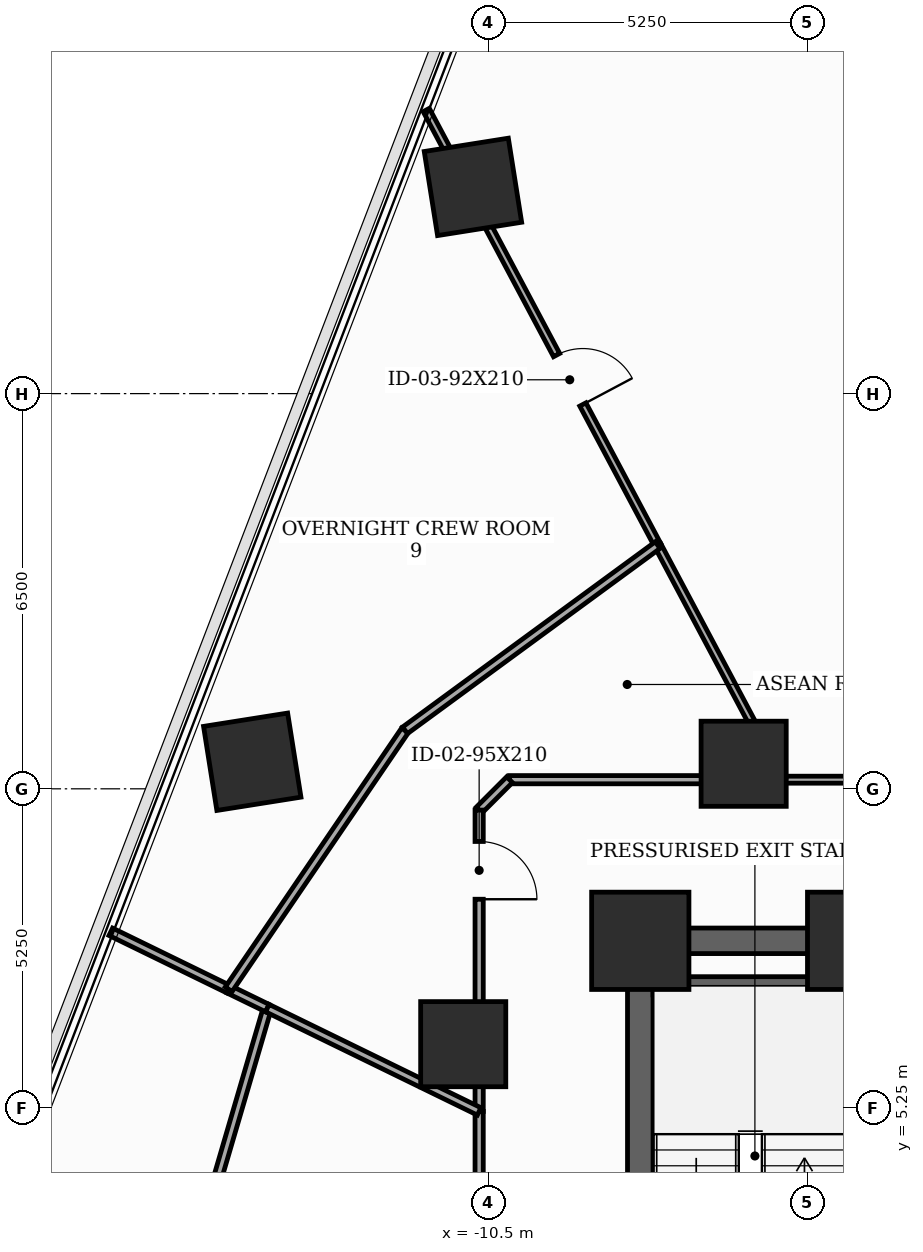
"""IFC4 building model, lengths in metres.
Left out: names, types, materials, properties, quantities, classifications, styles, units other than length and angle.
Written with IfcOpenShell. Run it as: python <this file> out.ifc"""

import sys

from ifc_helpers import new_model, si_unit, direction, frame, frame_2d, origin, origin_2d, place, context, subcontext, project, spatial, rectangle, extrude, element, fill, save


model = new_model("IFC4")
c1 = context("Model", 3, precision=1e-05, world=origin(), true_north=direction((0.0, 1.0)))
c2 = subcontext(c1, "Body", "Model", "MODEL_VIEW")
j1 = project(units=[si_unit("LENGTHUNIT", "METRE"), si_unit("PLANEANGLEUNIT", "RADIAN")], contexts=[c1])
p1 = place(None, origin())
s1 = spatial("IfcSite", under=j1, at=p1, CompositionType="ELEMENT")
p2 = place(p1, origin())
s2 = spatial("IfcBuilding", under=s1, at=p2, CompositionType="ELEMENT")
p3 = place(p2, frame((0.0, 0.0, 77.8)))
s3 = spatial("IfcBuildingStorey", under=s2, at=p3, CompositionType="ELEMENT", Elevation=77.8)
for number, where, z_axis, x_axis in (
    (1, (-4.45, 8.0, 0.0), (0.0, 0.0, 1.0), (1.0, 0.0, 0.0)),
    (2, (-8.0, 8.0, 0.0), (0.0, 0.0, 1.0), (1.0, 0.0, 0.0)),
):
    element("IfcColumn", number, at=place(p3, frame(where, z_axis=z_axis, x_axis=x_axis)), inside=s3, PredefinedType="COLUMN", context=c2, shape_type="SweptSolid", body=[
        extrude(rectangle(XDim=1.6, YDim=1.6, at=origin_2d()), origin(), (0.0, 0.0, 1.0), 3.7),
    ])
for number, where, z_axis, x_axis in (
    (3, (-6.3, 10.912, 0.0), (0.0, 0.0, 1.0), (1.0, 0.0, 0.0)),
    (4, (-10.912, 6.3, 0.0), (0.0, 0.0, 1.0), (1.0, 0.0, 0.0)),
    (5, (-10.752, 20.4, 0.0), (0.0, 0.0, 1.0), (0.988, 0.156, 0.0)),
    (6, (-14.381, 10.945, 0.0), (0.0, 0.0, 1.0), (0.988, 0.156, 0.0)),
):
    element("IfcColumn", number, at=place(p3, frame(where, z_axis=z_axis, x_axis=x_axis)), inside=s3, PredefinedType="COLUMN", context=c2, shape_type="SweptSolid", body=[
        extrude(rectangle(XDim=1.4, YDim=1.4, at=origin_2d()), origin(), (0.0, 0.0, 1.0), 3.7),
    ])
p4 = place(p3, frame((-8.0, -8.0, 0.0), z_axis=(0.0, 0.0, 1.0), x_axis=(0.0, 1.0, 0.0)))
e7 = element("IfcWall", 7, at=p4, inside=s3, PredefinedType="SHEAR", context=c2, shape_type="SweptSolid", body=[
    extrude(rectangle(XDim=16.0, YDim=0.42, at=frame_2d((8.0, 0.0))), origin(), (0.0, 0.0, 1.0), 3.5),
])
p5 = place(p4, frame((1.002, 0.0, 0.0)))
e8 = element("IfcOpeningElement", 8, at=p5, cuts=e7, PredefinedType="OPENING", context=c2, shape_type="SweptSolid", body=[
    extrude(rectangle(XDim=0.85, YDim=2.02, at=frame_2d((0.425, 1.01))), frame((0.0, 0.22, 0.0), z_axis=(0.0, -1.0, 0.0), x_axis=(1.0, 0.0, 0.0)), (0.0, 0.0, 1.0), 0.44),
])
p6 = place(p4, frame((5.35, 0.0, 0.0)))
e9 = element("IfcOpeningElement", 9, at=p6, cuts=e7, PredefinedType="OPENING", context=c2, shape_type="SweptSolid", body=[
    extrude(rectangle(XDim=1.05, YDim=2.15, at=frame_2d((0.525, 1.075))), frame((0.0, 0.22, 0.0), z_axis=(0.0, -1.0, 0.0), x_axis=(1.0, 0.0, 0.0)), (0.0, 0.0, 1.0), 0.44),
])
p7 = place(p3, frame((-8.0, 8.0, 0.0), z_axis=(0.0, 0.0, 1.0), x_axis=(1.0, 0.0, 0.0)))
e10 = element("IfcWall", 10, at=p7, inside=s3, PredefinedType="SHEAR", context=c2, shape_type="SweptSolid", body=[
    extrude(rectangle(XDim=16.0, YDim=0.42, at=frame_2d((8.0, 0.0))), origin(), (0.0, 0.0, 1.0), 3.5),
])
p8 = place(p7, frame((7.1, 0.0, 0.0)))
e11 = element("IfcOpeningElement", 11, at=p8, cuts=e10, PredefinedType="OPENING", context=c2, shape_type="SweptSolid", body=[
    extrude(rectangle(XDim=1.8, YDim=2.15, at=frame_2d((0.9, 1.075))), frame((0.0, 0.22, 0.0), z_axis=(0.0, -1.0, 0.0), x_axis=(1.0, 0.0, 0.0)), (0.0, 0.0, 1.0), 0.44),
])
p9 = place(p3, frame((-7.79, 7.26, 0.0), z_axis=(0.0, 0.0, 1.0), x_axis=(1.0, 0.0, 0.0)))
e12 = element("IfcWall", 12, at=p9, inside=s3, PredefinedType="SHEAR", context=c2, shape_type="SweptSolid", body=[
    extrude(rectangle(XDim=3.34, YDim=0.3, at=frame_2d((1.67, 0.0))), origin(), (0.0, 0.0, 1.0), 3.5),
])
p10 = place(p3, frame((1.715, 10.65, 0.0), z_axis=(0.0, 0.0, 1.0), x_axis=(-1.0, 0.0, 0.0)))
e13 = element("IfcWall", 13, at=p10, inside=s3, PredefinedType="PARTITIONING", context=c2, shape_type="SweptSolid", body=[
    extrude(rectangle(XDim=7.378, YDim=0.115, at=frame_2d((3.689, 0.0))), origin(), (0.0, 0.0, 1.0), 2.785),
])
p11 = place(p3, frame((-10.65, 5.194, 0.0), z_axis=(0.0, 0.0, 1.0), x_axis=(0.0, -1.0, 0.0)))
e14 = element("IfcWall", 14, at=p11, inside=s3, PredefinedType="PARTITIONING", context=c2, shape_type="SweptSolid", body=[
    extrude(rectangle(XDim=6.909, YDim=0.135, at=frame_2d((3.455, 0.0))), origin(), (0.0, 0.0, 1.0), 2.785),
])
p12 = place(p11, frame((2.979, 0.0, 0.0)))
e15 = element("IfcOpeningElement", 15, at=p12, cuts=e14, PredefinedType="OPENING", context=c2, shape_type="SweptSolid", body=[
    extrude(rectangle(XDim=0.95, YDim=2.1, at=frame_2d((0.475, 1.05))), frame((0.0, 0.077, 0.0), z_axis=(0.0, -1.0, 0.0), x_axis=(1.0, 0.0, 0.0)), (0.0, 0.0, 1.0), 0.155),
])
p13 = place(p3, frame((-5.663, 10.65, 0.0), z_axis=(0.0, 0.0, 1.0), x_axis=(-1.0, 0.0, 0.0)))
e16 = element("IfcWall", 16, at=p13, inside=s3, PredefinedType="PARTITIONING", context=c2, shape_type="SweptSolid", body=[
    extrude(rectangle(XDim=4.487, YDim=0.135, at=frame_2d((2.243, 0.0))), origin(), (0.0, 0.0, 1.0), 2.785),
])
p14 = place(p3, frame((-10.15, 10.65, 0.0), z_axis=(0.0, 0.0, 1.0), x_axis=(-0.707106781187, -0.707106781187, 0.0)))
e17 = element("IfcWall", 17, at=p14, inside=s3, PredefinedType="PARTITIONING", context=c2, shape_type="SweptSolid", body=[
    extrude(rectangle(XDim=0.707, YDim=0.135, at=frame_2d((0.354, 0.0))), origin(), (0.0, 0.0, 1.0), 3.5),
])
p15 = place(p3, frame((-10.65, 10.15, 0.0), z_axis=(0.0, 0.0, 1.0), x_axis=(0.0, -1.0, 0.0)))
e18 = element("IfcWall", 18, at=p15, inside=s3, PredefinedType="PARTITIONING", context=c2, shape_type="SweptSolid", body=[
    extrude(rectangle(XDim=4.956, YDim=0.135, at=frame_2d((2.478, 0.0))), origin(), (0.0, 0.0, 1.0), 2.785),
])
p16 = place(p15, frame((0.516, 0.0, 0.0)))
e19 = element("IfcOpeningElement", 19, at=p16, cuts=e18, PredefinedType="OPENING", context=c2, shape_type="SweptSolid", body=[
    extrude(rectangle(XDim=0.95, YDim=2.1, at=frame_2d((0.475, 1.05))), frame((0.0, 0.077, 0.0), z_axis=(0.0, -1.0, 0.0), x_axis=(1.0, 0.0, 0.0)), (0.0, 0.0, 1.0), 0.155),
])
p17 = place(p3, frame((-11.52, 21.665, 0.0), z_axis=(0.0, 0.0, 1.0), x_axis=(0.469518559383, -0.88292260272, 0.0)))
e20 = element("IfcWall", 20, at=p17, inside=s3, PredefinedType="PARTITIONING", context=c2, shape_type="SweptSolid", body=[
    extrude(rectangle(XDim=8.105, YDim=0.115, at=frame_2d((4.053, 0.0))), origin(), (0.0, 0.0, 1.0), 2.785),
])
p18 = place(p17, frame((4.565, 0.0, 0.0)))
e21 = element("IfcOpeningElement", 21, at=p18, cuts=e20, PredefinedType="OPENING", context=c2, shape_type="SweptSolid", body=[
    extrude(rectangle(XDim=0.92, YDim=2.1, at=frame_2d((0.46, 1.05))), frame((0.0, 0.067, 0.0), z_axis=(0.0, -1.0, 0.0), x_axis=(1.0, 0.0, 0.0)), (0.0, 0.0, 1.0), 0.135),
])
p19 = place(p3, frame((-7.714, 14.508, 0.0), z_axis=(0.0, 0.0, 1.0), x_axis=(0.469401685306, -0.882984743827, 0.0)))
e22 = element("IfcWall", 22, at=p19, inside=s3, PredefinedType="PARTITIONING", context=c2, shape_type="SweptSolid", body=[
    extrude(rectangle(XDim=4.369, YDim=0.115, at=frame_2d((2.185, 0.0))), origin(), (0.0, 0.0, 1.0), 2.785),
])
p20 = place(p3, frame((-15.736, 1.423, 0.0), z_axis=(0.0, 0.0, 1.0), x_axis=(0.281231672123, 0.959639904649, 0.0)))
e23 = element("IfcWall", 23, at=p20, inside=s3, PredefinedType="PARTITIONING", context=c2, shape_type="SweptSolid", body=[
    extrude(rectangle(XDim=5.7, YDim=0.135, at=frame_2d((2.85, 0.0))), origin(), (0.0, 0.0, 1.0), 3.5),
])
p21 = place(p3, frame((-14.769, 7.203, 0.0), z_axis=(0.0, 0.0, 1.0), x_axis=(-0.898774971292, 0.438410254191, 0.0)))
e24 = element("IfcWall", 24, at=p21, inside=s3, PredefinedType="PARTITIONING", context=c2, shape_type="SweptSolid", body=[
    extrude(rectangle(XDim=2.157, YDim=0.135, at=frame_2d((1.079, 0.0))), origin(), (0.0, 0.0, 1.0), 2.935),
])
p22 = place(p3, frame((-14.133, 6.893, 0.0), z_axis=(0.0, 0.0, 1.0), x_axis=(-0.899003804691, 0.437940816949, 0.0)))
e25 = element("IfcWall", 25, at=p22, inside=s3, PredefinedType="PARTITIONING", context=c2, shape_type="SweptSolid", body=[
    extrude(rectangle(XDim=0.708, YDim=0.135, at=frame_2d((0.354, 0.0))), origin(), (0.0, 0.0, 1.0), 3.5),
])
p23 = place(p3, frame((-10.65, 5.194, 0.0), z_axis=(0.0, 0.0, 1.0), x_axis=(-0.898781159743, 0.438397567159, 0.0)))
e26 = element("IfcWall", 26, at=p23, inside=s3, PredefinedType="PARTITIONING", context=c2, shape_type="SweptSolid", body=[
    extrude(rectangle(XDim=3.875, YDim=0.135, at=frame_2d((1.938, 0.0))), origin(), (0.0, 0.0, 1.0), 2.785),
])
p24 = place(p3, frame((-14.769, 7.203, 0.0), z_axis=(0.0, 0.0, 1.0), x_axis=(0.562841259026, 0.826565010836, 0.0)))
e27 = element("IfcWall", 27, at=p24, inside=s3, PredefinedType="PARTITIONING", context=c2, shape_type="SweptSolid", body=[
    extrude(rectangle(XDim=5.153, YDim=0.135, at=frame_2d((2.576, 0.0))), origin(), (0.0, 0.0, 1.0), 2.785),
])
p25 = place(p3, frame((-11.869, 11.462, 0.0), z_axis=(0.0, 0.0, 1.0), x_axis=(0.806469774548, 0.5912753189, 0.0)))
e28 = element("IfcWall", 28, at=p25, inside=s3, PredefinedType="PARTITIONING", context=c2, shape_type="SweptSolid", body=[
    extrude(rectangle(XDim=5.152, YDim=0.135, at=frame_2d((2.576, 0.0))), origin(), (0.0, 0.0, 1.0), 2.785),
])
p26 = place(p16, origin())
e29 = element("IfcDoor", 29, at=p26, inside=s3, OperationType="SINGLE_SWING_RIGHT", PredefinedType="DOOR", context=c2, shape_type="SweptSolid", body=[
    extrude(rectangle(XDim=0.95, YDim=2.1, at=frame_2d((0.475, 1.05))), frame((0.0, 0.025, 0.0), z_axis=(0.0, -1.0, 0.0), x_axis=(1.0, 0.0, 0.0)), (0.0, 0.0, 1.0), 0.05),
])
fill(e19, e29)
p27 = place(p18, origin())
e30 = element("IfcDoor", 30, at=p27, inside=s3, OperationType="SINGLE_SWING_RIGHT", PredefinedType="DOOR", context=c2, shape_type="SweptSolid", body=[
    extrude(rectangle(XDim=0.92, YDim=2.1, at=frame_2d((0.46, 1.05))), frame((0.0, 0.025, 0.0), z_axis=(0.0, -1.0, 0.0), x_axis=(1.0, 0.0, 0.0)), (0.0, 0.0, 1.0), 0.05),
])
fill(e21, e30)
save(model, sys.argv[1])
